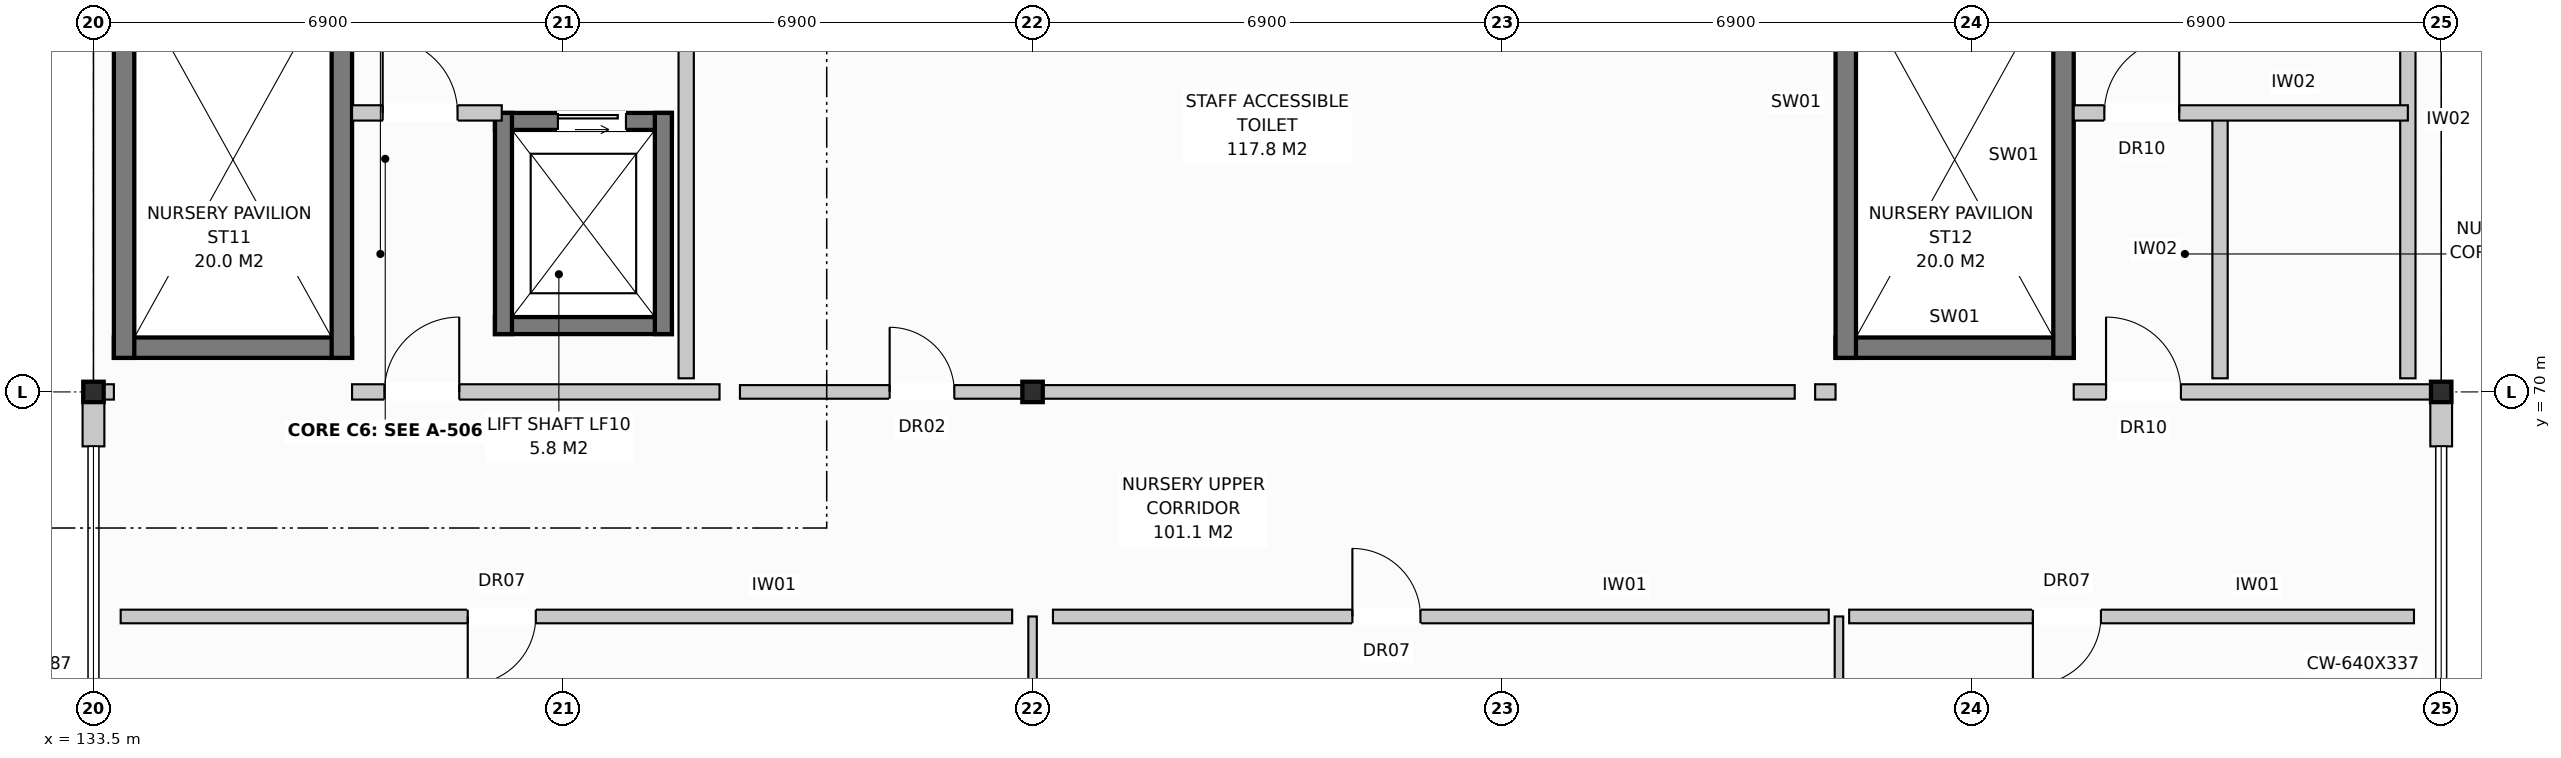
"""IFC4 building model, lengths in metres.
Left out: names, types, materials, properties, quantities, classifications, styles, units other than length and angle.
Written with IfcOpenShell. Run it as: python <this file> out.ifc"""

import sys

from ifc_helpers import new_model, si_unit, direction, frame, frame_2d, origin, origin_with_axes, origin_2d, place, context, subcontext, project, spatial, rectangle, i_section, extrude, element, fill, save


model = new_model("IFC4")
c1 = context("Model", 3, precision=1e-05, world=origin(), true_north=direction((0.0, 1.0)))
c2 = subcontext(c1, "Body", "Model", "MODEL_VIEW")
j1 = project(units=[si_unit("LENGTHUNIT", "METRE"), si_unit("PLANEANGLEUNIT", "RADIAN")], contexts=[c1])
p1 = place(None, origin())
s1 = spatial("IfcSite", under=j1, at=p1, CompositionType="ELEMENT")
p2 = place(p1, origin())
s2 = spatial("IfcBuilding", under=s1, at=p2, CompositionType="ELEMENT")
p3 = place(p2, frame((0.0, 0.0, 4.4)))
s3 = spatial("IfcBuildingStorey", under=s2, at=p3, CompositionType="ELEMENT", Elevation=4.4)
for number, where, z_axis, x_axis in (
    (1, (133.5, 70.0, 0.0), (0.0, 0.0, 1.0), (1.0, 0.0, 0.0)),
    (2, (147.3, 70.0, 0.0), (0.0, 0.0, 1.0), (1.0, 0.0, 0.0)),
    (3, (168.0, 70.0, 0.0), (0.0, 0.0, 1.0), (1.0, 0.0, 0.0)),
):
    element("IfcColumn", number, at=place(p3, frame(where, z_axis=z_axis, x_axis=x_axis)), inside=s3, PredefinedType="COLUMN", context=c2, shape_type="SweptSolid", body=[
        extrude(i_section(OverallWidth=0.3, OverallDepth=0.3, WebThickness=0.011, FlangeThickness=0.019, at=origin_2d()), origin(), (0.0, 0.0, 1.0), 3.6),
    ])
p4 = place(p3, frame((133.5, 69.2, 0.0), z_axis=(0.0, 0.0, 1.0), x_axis=(0.0, 1.0, 0.0)))
e4 = element("IfcWall", 4, at=p4, inside=s3, PredefinedType="STANDARD", context=c2, shape_type="SweptSolid", body=[
    extrude(rectangle(XDim=0.8, YDim=0.32, at=frame_2d((0.4, 0.0))), origin(), (0.0, 0.0, 1.0), 2.87),
])
p5 = place(p3, frame((168.0, 69.2, 0.0), z_axis=(0.0, 0.0, 1.0), x_axis=(0.0, 1.0, 0.0)))
e5 = element("IfcWall", 5, at=p5, inside=s3, PredefinedType="STANDARD", context=c2, shape_type="SweptSolid", body=[
    extrude(rectangle(XDim=0.8, YDim=0.32, at=frame_2d((0.4, 0.0))), origin(), (0.0, 0.0, 1.0), 3.37),
])
p6 = place(p3, frame((133.8, 70.65, 0.0), z_axis=(0.0, 0.0, 1.0), x_axis=(1.0, 0.0, 0.0)))
e6 = element("IfcWall", 6, at=p6, inside=s3, PredefinedType="SHEAR", context=c2, shape_type="SweptSolid", body=[
    extrude(rectangle(XDim=3.5, YDim=0.3, at=frame_2d((1.75, 0.0))), origin(), (0.0, 0.0, 1.0), 3.33),
])
p7 = place(p3, frame((133.95, 70.5, 0.0), z_axis=(0.0, 0.0, 1.0), x_axis=(0.0, 1.0, 0.0)))
e7 = element("IfcWall", 7, at=p7, inside=s3, PredefinedType="SHEAR", context=c2, shape_type="SweptSolid", body=[
    extrude(rectangle(XDim=7.5, YDim=0.3, at=frame_2d((3.75, 0.0))), origin(), (0.0, 0.0, 1.0), 3.33),
])
p8 = place(p3, frame((137.15, 70.5, 0.0), z_axis=(0.0, 0.0, 1.0), x_axis=(0.0, 1.0, 0.0)))
e8 = element("IfcWall", 8, at=p8, inside=s3, PredefinedType="SHEAR", context=c2, shape_type="SweptSolid", body=[
    extrude(rectangle(XDim=7.5, YDim=0.3, at=frame_2d((3.75, 0.0))), origin(), (0.0, 0.0, 1.0), 3.33),
])
p9 = place(p8, frame((5.7, 0.0, 0.0)))
e9 = element("IfcOpeningElement", 9, at=p9, cuts=e8, PredefinedType="OPENING", context=c2, shape_type="SweptSolid", body=[
    extrude(rectangle(XDim=1.15, YDim=2.15, at=frame_2d((0.575, 1.075))), frame((0.0, 0.162, 0.0), z_axis=(0.0, -1.0, 0.0), x_axis=(1.0, 0.0, 0.0)), (0.0, 0.0, 1.0), 0.324),
])
p10 = place(p3, frame((139.4, 73.975, 0.0), z_axis=(0.0, 0.0, 1.0), x_axis=(1.0, 0.0, 0.0)))
e10 = element("IfcWall", 10, at=p10, inside=s3, PredefinedType="SHEAR", context=c2, shape_type="SweptSolid", body=[
    extrude(rectangle(XDim=2.6, YDim=0.25, at=frame_2d((1.3, 0.0))), origin(), (0.0, 0.0, 1.0), 3.33),
])
p11 = place(p10, frame((0.925, 0.0, 0.0)))
e11 = element("IfcOpeningElement", 11, at=p11, cuts=e10, PredefinedType="OPENING", context=c2, shape_type="SweptSolid", body=[
    extrude(rectangle(XDim=1.0, YDim=2.1, at=frame_2d((0.5, 1.05))), frame((0.0, 0.137, 0.0), z_axis=(0.0, -1.0, 0.0), x_axis=(1.0, 0.0, 0.0)), (0.0, 0.0, 1.0), 0.274),
])
p12 = place(p3, frame((139.4, 70.975, 0.0), z_axis=(0.0, 0.0, 1.0), x_axis=(1.0, 0.0, 0.0)))
e12 = element("IfcWall", 12, at=p12, inside=s3, PredefinedType="SHEAR", context=c2, shape_type="SweptSolid", body=[
    extrude(rectangle(XDim=2.6, YDim=0.25, at=frame_2d((1.3, 0.0))), origin(), (0.0, 0.0, 1.0), 3.33),
])
for number, where, z_axis, x_axis in (
    (13, (139.525, 70.85, 0.0), (0.0, 0.0, 1.0), (0.0, 1.0, 0.0)),
    (14, (141.875, 70.85, 0.0), (0.0, 0.0, 1.0), (0.0, 1.0, 0.0)),
):
    element("IfcWall", number, at=place(p3, frame(where, z_axis=z_axis, x_axis=x_axis)), inside=s3, PredefinedType="SHEAR", context=c2, shape_type="SweptSolid", body=[
        extrude(rectangle(XDim=3.25, YDim=0.25, at=frame_2d((1.625, 0.0))), origin(), (0.0, 0.0, 1.0), 3.33),
    ])
p13 = place(p3, frame((142.21, 70.2, 0.0), z_axis=(0.0, 0.0, 1.0), x_axis=(0.0, 1.0, 0.0)))
e15 = element("IfcWall", 15, at=p13, inside=s3, PredefinedType="PARTITIONING", context=c2, shape_type="SweptSolid", body=[
    extrude(rectangle(XDim=7.6, YDim=0.225, at=frame_2d((3.8, 0.0))), origin(), (0.0, 0.0, 1.0), 3.33),
])
p14 = place(p3, frame((137.3, 74.1, 0.0), z_axis=(0.0, 0.0, 1.0), x_axis=(1.0, 0.0, 0.0)))
e16 = element("IfcWall", 16, at=p14, inside=s3, PredefinedType="PARTITIONING", context=c2, shape_type="SweptSolid", body=[
    extrude(rectangle(XDim=2.2, YDim=0.225, at=frame_2d((1.1, 0.0))), origin(), (0.0, 0.0, 1.0), 3.33),
])
p15 = place(p14, frame((0.45, 0.0, 0.0)))
e17 = element("IfcOpeningElement", 17, at=p15, cuts=e16, PredefinedType="OPENING", context=c2, shape_type="SweptSolid", body=[
    extrude(rectangle(XDim=1.1, YDim=2.15, at=frame_2d((0.55, 1.075))), frame((0.0, 0.125, 0.0), z_axis=(0.0, -1.0, 0.0), x_axis=(1.0, 0.0, 0.0)), (0.0, 0.0, 1.0), 0.249),
])
p16 = place(p3, frame((133.65, 70.0, 0.0), z_axis=(0.0, 0.0, 1.0), x_axis=(1.0, 0.0, 0.0)))
e18 = element("IfcWall", 18, at=p16, inside=s3, PredefinedType="PARTITIONING", context=c2, shape_type="SweptSolid", body=[
    extrude(rectangle(XDim=0.15, YDim=0.225, at=frame_2d((0.075, 0.0))), origin(), (0.0, 0.0, 1.0), 3.33),
])
p17 = place(p3, frame((137.3, 70.0, 0.0), z_axis=(0.0, 0.0, 1.0), x_axis=(1.0, 0.0, 0.0)))
e19 = element("IfcWall", 19, at=p17, inside=s3, PredefinedType="PARTITIONING", context=c2, shape_type="SweptSolid", body=[
    extrude(rectangle(XDim=5.4, YDim=0.225, at=frame_2d((2.7, 0.0))), origin(), (0.0, 0.0, 1.0), 2.79),
])
p18 = place(p17, frame((0.475, 0.0, 0.0)))
e20 = element("IfcOpeningElement", 20, at=p18, cuts=e19, PredefinedType="OPENING", context=c2, shape_type="SweptSolid", body=[
    extrude(rectangle(XDim=1.1, YDim=2.15, at=frame_2d((0.55, 1.075))), frame((0.0, 0.125, 0.0), z_axis=(0.0, -1.0, 0.0), x_axis=(1.0, 0.0, 0.0)), (0.0, 0.0, 1.0), 0.249),
])
p19 = place(p3, frame((159.1, 70.65, 0.0), z_axis=(0.0, 0.0, 1.0), x_axis=(1.0, 0.0, 0.0)))
e21 = element("IfcWall", 21, at=p19, inside=s3, PredefinedType="SHEAR", context=c2, shape_type="SweptSolid", body=[
    extrude(rectangle(XDim=3.5, YDim=0.3, at=frame_2d((1.75, 0.0))), origin(), (0.0, 0.0, 1.0), 3.33),
])
p20 = place(p3, frame((159.25, 70.5, 0.0), z_axis=(0.0, 0.0, 1.0), x_axis=(0.0, 1.0, 0.0)))
e22 = element("IfcWall", 22, at=p20, inside=s3, PredefinedType="SHEAR", context=c2, shape_type="SweptSolid", body=[
    extrude(rectangle(XDim=7.5, YDim=0.3, at=frame_2d((3.75, 0.0))), origin(), (0.0, 0.0, 1.0), 3.33),
])
p21 = place(p3, frame((162.45, 70.5, 0.0), z_axis=(0.0, 0.0, 1.0), x_axis=(0.0, 1.0, 0.0)))
e23 = element("IfcWall", 23, at=p21, inside=s3, PredefinedType="SHEAR", context=c2, shape_type="SweptSolid", body=[
    extrude(rectangle(XDim=7.5, YDim=0.3, at=frame_2d((3.75, 0.0))), origin(), (0.0, 0.0, 1.0), 3.33),
])
p22 = place(p21, frame((5.7, 0.0, 0.0)))
e24 = element("IfcOpeningElement", 24, at=p22, cuts=e23, PredefinedType="OPENING", context=c2, shape_type="SweptSolid", body=[
    extrude(rectangle(XDim=1.15, YDim=2.15, at=frame_2d((0.575, 1.075))), frame((0.0, 0.162, 0.0), z_axis=(0.0, -1.0, 0.0), x_axis=(1.0, 0.0, 0.0)), (0.0, 0.0, 1.0), 0.324),
])
p23 = place(p3, frame((167.51, 70.2, 0.0), z_axis=(0.0, 0.0, 1.0), x_axis=(0.0, 1.0, 0.0)))
e25 = element("IfcWall", 25, at=p23, inside=s3, PredefinedType="PARTITIONING", context=c2, shape_type="SweptSolid", body=[
    extrude(rectangle(XDim=7.6, YDim=0.225, at=frame_2d((3.8, 0.0))), origin(), (0.0, 0.0, 1.0), 3.33),
])
p24 = place(p3, frame((164.75, 70.2, 0.0), z_axis=(0.0, 0.0, 1.0), x_axis=(0.0, 1.0, 0.0)))
e26 = element("IfcWall", 26, at=p24, inside=s3, PredefinedType="PARTITIONING", context=c2, shape_type="SweptSolid", body=[
    extrude(rectangle(XDim=3.8, YDim=0.225, at=frame_2d((1.9, 0.0))), origin(), (0.0, 0.0, 1.0), 3.33),
])
p25 = place(p3, frame((162.6, 74.1, 0.0), z_axis=(0.0, 0.0, 1.0), x_axis=(1.0, 0.0, 0.0)))
e27 = element("IfcWall", 27, at=p25, inside=s3, PredefinedType="PARTITIONING", context=c2, shape_type="SweptSolid", body=[
    extrude(rectangle(XDim=4.91, YDim=0.225, at=frame_2d((2.455, 0.0))), origin(), (0.0, 0.0, 1.0), 3.33),
])
p26 = place(p25, frame((0.45, 0.0, 0.0)))
e28 = element("IfcOpeningElement", 28, at=p26, cuts=e27, PredefinedType="OPENING", context=c2, shape_type="SweptSolid", body=[
    extrude(rectangle(XDim=1.1, YDim=2.15, at=frame_2d((0.55, 1.075))), frame((0.0, 0.125, 0.0), z_axis=(0.0, -1.0, 0.0), x_axis=(1.0, 0.0, 0.0)), (0.0, 0.0, 1.0), 0.249),
])
p27 = place(p3, frame((158.8, 70.0, 0.0), z_axis=(0.0, 0.0, 1.0), x_axis=(1.0, 0.0, 0.0)))
e29 = element("IfcWall", 29, at=p27, inside=s3, PredefinedType="PARTITIONING", context=c2, shape_type="SweptSolid", body=[
    extrude(rectangle(XDim=0.3, YDim=0.225, at=frame_2d((0.15, 0.0))), origin(), (0.0, 0.0, 1.0), 3.33),
])
p28 = place(p3, frame((162.6, 70.0, 0.0), z_axis=(0.0, 0.0, 1.0), x_axis=(1.0, 0.0, 0.0)))
e30 = element("IfcWall", 30, at=p28, inside=s3, PredefinedType="PARTITIONING", context=c2, shape_type="SweptSolid", body=[
    extrude(rectangle(XDim=5.25, YDim=0.225, at=frame_2d((2.625, 0.0))), origin(), (0.0, 0.0, 1.0), 2.69),
])
p29 = place(p28, frame((0.475, 0.0, 0.0)))
e31 = element("IfcOpeningElement", 31, at=p29, cuts=e30, PredefinedType="OPENING", context=c2, shape_type="SweptSolid", body=[
    extrude(rectangle(XDim=1.1, YDim=2.15, at=frame_2d((0.55, 1.075))), frame((0.0, 0.125, 0.0), z_axis=(0.0, -1.0, 0.0), x_axis=(1.0, 0.0, 0.0)), (0.0, 0.0, 1.0), 0.249),
])
p30 = place(p3, frame((133.9, 66.7, 0.0), z_axis=(0.0, 0.0, 1.0), x_axis=(1.0, 0.0, 0.0)))
e32 = element("IfcWall", 32, at=p30, inside=s3, PredefinedType="PARTITIONING", context=c2, shape_type="SweptSolid", body=[
    extrude(rectangle(XDim=13.1, YDim=0.2, at=frame_2d((6.55, 0.0))), origin(), (0.0, 0.0, 1.0), 3.33),
])
p31 = place(p30, frame((5.1, 0.0, 0.0)))
e33 = element("IfcOpeningElement", 33, at=p31, cuts=e32, PredefinedType="OPENING", context=c2, shape_type="SweptSolid", body=[
    extrude(rectangle(XDim=1.0, YDim=2.15, at=frame_2d((0.5, 1.075))), frame((0.0, 0.112, 0.0), z_axis=(0.0, -1.0, 0.0), x_axis=(1.0, 0.0, 0.0)), (0.0, 0.0, 1.0), 0.224),
])
p32 = place(p3, frame((147.6, 66.7, 0.0), z_axis=(0.0, 0.0, 1.0), x_axis=(1.0, 0.0, 0.0)))
e34 = element("IfcWall", 34, at=p32, inside=s3, PredefinedType="PARTITIONING", context=c2, shape_type="SweptSolid", body=[
    extrude(rectangle(XDim=11.4, YDim=0.2, at=frame_2d((5.7, 0.0))), origin(), (0.0, 0.0, 1.0), 3.33),
])
p33 = place(p32, frame((4.4, 0.0, 0.0)))
e35 = element("IfcOpeningElement", 35, at=p33, cuts=e34, PredefinedType="OPENING", context=c2, shape_type="SweptSolid", body=[
    extrude(rectangle(XDim=1.0, YDim=2.15, at=frame_2d((0.5, 1.075))), frame((0.0, 0.112, 0.0), z_axis=(0.0, -1.0, 0.0), x_axis=(1.0, 0.0, 0.0)), (0.0, 0.0, 1.0), 0.224),
])
p34 = place(p3, frame((159.3, 66.7, 0.0), z_axis=(0.0, 0.0, 1.0), x_axis=(1.0, 0.0, 0.0)))
e36 = element("IfcWall", 36, at=p34, inside=s3, PredefinedType="PARTITIONING", context=c2, shape_type="SweptSolid", body=[
    extrude(rectangle(XDim=8.3, YDim=0.2, at=frame_2d((4.15, 0.0))), origin(), (0.0, 0.0, 1.0), 3.33),
])
p35 = place(p34, frame((2.7, 0.0, 0.0)))
e37 = element("IfcOpeningElement", 37, at=p35, cuts=e36, PredefinedType="OPENING", context=c2, shape_type="SweptSolid", body=[
    extrude(rectangle(XDim=1.0, YDim=2.15, at=frame_2d((0.5, 1.075))), frame((0.0, 0.112, 0.0), z_axis=(0.0, -1.0, 0.0), x_axis=(1.0, 0.0, 0.0)), (0.0, 0.0, 1.0), 0.224),
])
p36 = place(p3, frame((147.3, 54.4, 0.0), z_axis=(0.0, 0.0, 1.0), x_axis=(0.0, 1.0, 0.0)))
e38 = element("IfcWall", 38, at=p36, inside=s3, PredefinedType="PARTITIONING", context=c2, shape_type="SweptSolid", body=[
    extrude(rectangle(XDim=12.3, YDim=0.125, at=frame_2d((6.15, 0.0))), origin(), (0.0, 0.0, 1.0), 2.78),
])
p37 = place(p3, frame((159.15, 54.4, 0.0), z_axis=(0.0, 0.0, 1.0), x_axis=(0.0, 1.0, 0.0)))
e39 = element("IfcWall", 39, at=p37, inside=s3, PredefinedType="PARTITIONING", context=c2, shape_type="SweptSolid", body=[
    extrude(rectangle(XDim=12.3, YDim=0.125, at=frame_2d((6.15, 0.0))), origin(), (0.0, 0.0, 1.0), 3.33),
])
p38 = place(p3, frame((143.0, 70.0, 0.0), z_axis=(0.0, 0.0, 1.0), x_axis=(1.0, 0.0, 0.0)))
e40 = element("IfcWall", 40, at=p38, inside=s3, PredefinedType="PARTITIONING", context=c2, shape_type="SweptSolid", body=[
    extrude(rectangle(XDim=15.5, YDim=0.2, at=frame_2d((7.75, 0.0))), origin(), (0.0, 0.0, 1.0), 2.69),
])
p39 = place(p38, frame((2.2, 0.0, 0.0)))
e41 = element("IfcOpeningElement", 41, at=p39, cuts=e40, PredefinedType="OPENING", context=c2, shape_type="SweptSolid", body=[
    extrude(rectangle(XDim=0.95, YDim=2.15, at=frame_2d((0.475, 1.075))), frame((0.0, 0.112, 0.0), z_axis=(0.0, -1.0, 0.0), x_axis=(1.0, 0.0, 0.0)), (0.0, 0.0, 1.0), 0.224),
])
p40 = place(p11, origin_with_axes())
e42 = element("IfcDoor", 42, at=p40, inside=s3, OperationType="SLIDING_TO_LEFT", PredefinedType="DOOR", context=c2, shape_type="SweptSolid", body=[
    extrude(rectangle(XDim=1.0, YDim=2.1, at=frame_2d((0.5, 1.05))), frame((0.0, 0.025, 0.0), z_axis=(0.0, -1.0, 0.0), x_axis=(1.0, 0.0, 0.0)), (0.0, 0.0, 1.0), 0.05),
])
fill(e11, e42)
p41 = place(p15, origin_with_axes())
e43 = element("IfcDoor", 43, at=p41, inside=s3, OperationType="SINGLE_SWING_LEFT", PredefinedType="DOOR", context=c2, shape_type="SweptSolid", body=[
    extrude(rectangle(XDim=1.1, YDim=2.15, at=frame_2d((0.55, 1.075))), frame((0.0, 0.025, 0.0), z_axis=(0.0, -1.0, 0.0), x_axis=(1.0, 0.0, 0.0)), (0.0, 0.0, 1.0), 0.05),
])
fill(e17, e43)
p42 = place(p18, origin_with_axes())
e44 = element("IfcDoor", 44, at=p42, inside=s3, OperationType="SINGLE_SWING_RIGHT", PredefinedType="DOOR", context=c2, shape_type="SweptSolid", body=[
    extrude(rectangle(XDim=1.1, YDim=2.15, at=frame_2d((0.55, 1.075))), frame((0.0, 0.025, 0.0), z_axis=(0.0, -1.0, 0.0), x_axis=(1.0, 0.0, 0.0)), (0.0, 0.0, 1.0), 0.05),
])
fill(e20, e44)
p43 = place(p26, origin_with_axes())
e45 = element("IfcDoor", 45, at=p43, inside=s3, OperationType="SINGLE_SWING_RIGHT", PredefinedType="DOOR", context=c2, shape_type="SweptSolid", body=[
    extrude(rectangle(XDim=1.1, YDim=2.15, at=frame_2d((0.55, 1.075))), frame((0.0, 0.025, 0.0), z_axis=(0.0, -1.0, 0.0), x_axis=(1.0, 0.0, 0.0)), (0.0, 0.0, 1.0), 0.05),
])
fill(e28, e45)
p44 = place(p29, origin_with_axes())
e46 = element("IfcDoor", 46, at=p44, inside=s3, OperationType="SINGLE_SWING_LEFT", PredefinedType="DOOR", context=c2, shape_type="SweptSolid", body=[
    extrude(rectangle(XDim=1.1, YDim=2.15, at=frame_2d((0.55, 1.075))), frame((0.0, 0.025, 0.0), z_axis=(0.0, -1.0, 0.0), x_axis=(1.0, 0.0, 0.0)), (0.0, 0.0, 1.0), 0.05),
])
fill(e31, e46)
p45 = place(p31, frame((1.0, 0.0, 0.0), z_axis=(0.0, 0.0, 1.0), x_axis=(-1.0, 0.0, 0.0)))
e47 = element("IfcDoor", 47, at=p45, inside=s3, OperationType="SINGLE_SWING_LEFT", PredefinedType="DOOR", context=c2, shape_type="SweptSolid", body=[
    extrude(rectangle(XDim=1.0, YDim=2.15, at=frame_2d((0.5, 1.075))), frame((0.0, 0.025, 0.0), z_axis=(0.0, -1.0, 0.0), x_axis=(1.0, 0.0, 0.0)), (0.0, 0.0, 1.0), 0.05),
])
fill(e33, e47)
p46 = place(p33, origin_with_axes())
e48 = element("IfcDoor", 48, at=p46, inside=s3, OperationType="SINGLE_SWING_LEFT", PredefinedType="DOOR", context=c2, shape_type="SweptSolid", body=[
    extrude(rectangle(XDim=1.0, YDim=2.15, at=frame_2d((0.5, 1.075))), frame((0.0, 0.025, 0.0), z_axis=(0.0, -1.0, 0.0), x_axis=(1.0, 0.0, 0.0)), (0.0, 0.0, 1.0), 0.05),
])
fill(e35, e48)
p47 = place(p35, frame((1.0, 0.0, 0.0), z_axis=(0.0, 0.0, 1.0), x_axis=(-1.0, 0.0, 0.0)))
e49 = element("IfcDoor", 49, at=p47, inside=s3, OperationType="SINGLE_SWING_LEFT", PredefinedType="DOOR", context=c2, shape_type="SweptSolid", body=[
    extrude(rectangle(XDim=1.0, YDim=2.15, at=frame_2d((0.5, 1.075))), frame((0.0, 0.025, 0.0), z_axis=(0.0, -1.0, 0.0), x_axis=(1.0, 0.0, 0.0)), (0.0, 0.0, 1.0), 0.05),
])
fill(e37, e49)
p48 = place(p39, origin_with_axes())
e50 = element("IfcDoor", 50, at=p48, inside=s3, OperationType="SINGLE_SWING_LEFT", PredefinedType="DOOR", context=c2, shape_type="SweptSolid", body=[
    extrude(rectangle(XDim=0.95, YDim=2.15, at=frame_2d((0.475, 1.075))), frame((0.0, 0.025, 0.0), z_axis=(0.0, -1.0, 0.0), x_axis=(1.0, 0.0, 0.0)), (0.0, 0.0, 1.0), 0.05),
])
fill(e41, e50)
save(model, sys.argv[1])
